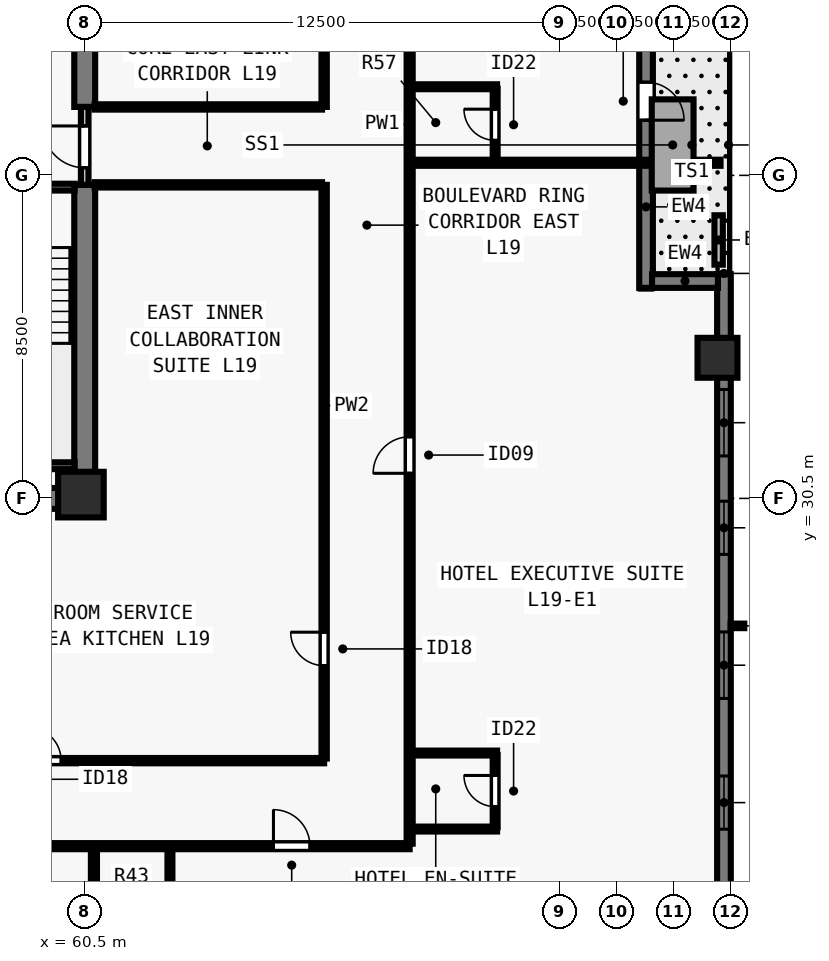
"""IFC4 building model, lengths in metres.
Left out: names, types, materials, properties, quantities, classifications, styles, units other than length and angle.
Written with IfcOpenShell. Run it as: python <this file> out.ifc"""

import sys

from ifc_helpers import new_model, si_unit, direction, frame, frame_2d, origin, origin_2d, place, context, subcontext, project, spatial, rectangle, extrude, element, fill, save


model = new_model("IFC4")
c1 = context("Model", 3, precision=1e-05, world=origin(), true_north=direction((0.0, 1.0)))
c2 = subcontext(c1, "Body", "Model", "MODEL_VIEW")
j1 = project(units=[si_unit("LENGTHUNIT", "METRE"), si_unit("PLANEANGLEUNIT", "RADIAN")], contexts=[c1])
p1 = place(None, origin())
s1 = spatial("IfcSite", under=j1, at=p1, CompositionType="ELEMENT")
p2 = place(p1, origin())
s2 = spatial("IfcBuilding", under=s1, at=p2, CompositionType="ELEMENT")
p3 = place(p2, frame((0.0, 0.0, 72.5)))
s3 = spatial("IfcBuildingStorey", under=s2, at=p3, CompositionType="ELEMENT", Elevation=72.5)
p4 = place(p3, frame((60.4, 30.6, 0.0), z_axis=(0.0, 0.0, 1.0), x_axis=(1.0, 0.0, 0.0)))
e1 = element("IfcColumn", 1, at=p4, inside=s3, PredefinedType="COLUMN", context=c2, shape_type="SweptSolid", body=[
    extrude(rectangle(XDim=1.2, YDim=1.2, at=origin_2d()), origin(), (0.0, 0.0, 1.0), 3.5),
])
p5 = place(p3, frame((77.15, 34.2, 0.0), z_axis=(0.0, 0.0, 1.0), x_axis=(0.0, 1.0, 0.0)))
e2 = element("IfcColumn", 2, at=p5, inside=s3, PredefinedType="COLUMN", context=c2, shape_type="SweptSolid", body=[
    extrude(rectangle(XDim=1.05, YDim=1.05, at=origin_2d()), origin(), (0.0, 0.0, 1.0), 3.5),
])
p6 = place(p3, frame((77.32, 36.4, 0.0), z_axis=(0.0, 0.0, 1.0), x_axis=(0.0, -1.0, 0.0)))
e3 = element("IfcWall", 3, at=p6, inside=s3, PredefinedType="SOLIDWALL", context=c2, shape_type="SweptSolid", body=[
    extrude(rectangle(XDim=19.562, YDim=0.36, at=frame_2d((9.781, 0.0))), origin(), (0.0, 0.0, 1.0), 3.28),
])
p7 = place(p6, frame((3.033, 0.0, 0.8)))
e4 = element("IfcOpeningElement", 4, at=p7, cuts=e3, PredefinedType="OPENING", context=c2, shape_type="SweptSolid", body=[
    extrude(rectangle(XDim=1.75, YDim=1.544, at=frame_2d((0.875, 0.772))), frame((0.0, 0.19, 0.0), z_axis=(0.0, -1.0, 0.0), x_axis=(1.0, 0.0, 0.0)), (0.0, 0.0, 1.0), 0.38),
])
p8 = place(p6, frame((5.973, 0.0, 0.8)))
e5 = element("IfcOpeningElement", 5, at=p8, cuts=e3, PredefinedType="OPENING", context=c2, shape_type="SweptSolid", body=[
    extrude(rectangle(XDim=1.4, YDim=1.544, at=frame_2d((0.7, 0.772))), frame((0.0, 0.19, 0.0), z_axis=(0.0, -1.0, 0.0), x_axis=(1.0, 0.0, 0.0)), (0.0, 0.0, 1.0), 0.38),
])
p9 = place(p6, frame((9.414, 0.0, 0.8)))
e6 = element("IfcOpeningElement", 6, at=p9, cuts=e3, PredefinedType="OPENING", context=c2, shape_type="SweptSolid", body=[
    extrude(rectangle(XDim=1.75, YDim=1.544, at=frame_2d((0.875, 0.772))), frame((0.0, 0.19, 0.0), z_axis=(0.0, -1.0, 0.0), x_axis=(1.0, 0.0, 0.0)), (0.0, 0.0, 1.0), 0.38),
])
p10 = place(p6, frame((13.204, 0.0, 0.8)))
e7 = element("IfcOpeningElement", 7, at=p10, cuts=e3, PredefinedType="OPENING", context=c2, shape_type="SweptSolid", body=[
    extrude(rectangle(XDim=1.4, YDim=1.544, at=frame_2d((0.7, 0.772))), frame((0.0, 0.19, 0.0), z_axis=(0.0, -1.0, 0.0), x_axis=(1.0, 0.0, 0.0)), (0.0, 0.0, 1.0), 0.38),
])
p11 = place(p3, frame((75.27, 43.222, 0.0), z_axis=(0.0, 0.0, 1.0), x_axis=(0.0, -1.0, 0.0)))
e8 = element("IfcWall", 8, at=p11, inside=s3, PredefinedType="SOLIDWALL", context=c2, shape_type="SweptSolid", body=[
    extrude(rectangle(XDim=7.182, YDim=0.36, at=frame_2d((3.591, 0.0))), origin(), (0.0, 0.0, 1.0), 3.28),
])
p12 = place(p11, frame((1.77, 0.0, 0.0)))
e9 = element("IfcOpeningElement", 9, at=p12, cuts=e8, PredefinedType="OPENING", context=c2, shape_type="SweptSolid", body=[
    extrude(rectangle(XDim=1.0, YDim=2.15, at=frame_2d((0.5, 1.075))), frame((0.0, 0.19, 0.0), z_axis=(0.0, -1.0, 0.0), x_axis=(1.0, 0.0, 0.0)), (0.0, 0.0, 1.0), 0.38),
])
p13 = place(p3, frame((75.428, 36.22, 0.0), z_axis=(0.0, 0.0, 1.0), x_axis=(1.0, 0.0, 0.0)))
e10 = element("IfcWall", 10, at=p13, inside=s3, PredefinedType="SOLIDWALL", context=c2, shape_type="SweptSolid", body=[
    extrude(rectangle(XDim=1.734, YDim=0.36, at=frame_2d((0.867, 0.0))), origin(), (0.0, 0.0, 1.0), 3.28),
])
p14 = place(p3, frame((77.18, 36.65, 0.0), z_axis=(0.0, 0.0, 1.0), x_axis=(0.0, 1.0, 0.0)))
e11 = element("IfcWall", 11, at=p14, inside=s3, PredefinedType="PARAPET", context=c2, shape_type="SweptSolid", body=[
    extrude(rectangle(XDim=1.3, YDim=0.22, at=frame_2d((0.65, 0.0))), origin(), (0.0, 0.0, 1.0), 0.55),
])
p15 = place(p3, frame((43.225, 30.5, 0.0), z_axis=(0.0, 0.0, 1.0), x_axis=(1.0, 0.0, 0.0)))
e12 = element("IfcWall", 12, at=p15, inside=s3, PredefinedType="SHEAR", context=c2, shape_type="SweptSolid", body=[
    extrude(rectangle(XDim=17.55, YDim=0.55, at=frame_2d((8.775, 0.0))), origin(), (0.0, 0.0, 1.0), 3.28),
])
p16 = place(p3, frame((60.5, 30.765, 0.0), z_axis=(0.0, 0.0, 1.0), x_axis=(0.0, 1.0, 0.0)))
e13 = element("IfcWall", 13, at=p16, inside=s3, PredefinedType="SHEAR", context=c2, shape_type="SweptSolid", body=[
    extrude(rectangle(XDim=7.985, YDim=0.55, at=frame_2d((3.993, 0.0))), origin(), (0.0, 0.0, 1.0), 3.28),
])
p17 = place(p3, frame((60.5, 40.8, 0.0), z_axis=(0.0, 0.0, 1.0), x_axis=(0.0, 1.0, 0.0)))
e14 = element("IfcWall", 14, at=p17, inside=s3, PredefinedType="SHEAR", context=c2, shape_type="SweptSolid", body=[
    extrude(rectangle(XDim=6.435, YDim=0.55, at=frame_2d((3.218, 0.0))), origin(), (0.0, 0.0, 1.0), 3.28),
])
p18 = place(p3, frame((60.5, 38.75, 0.0), z_axis=(0.0, 0.0, 1.0), x_axis=(0.0, 1.0, 0.0)))
e15 = element("IfcWall", 15, at=p18, inside=s3, PredefinedType="SOLIDWALL", context=c2, shape_type="SweptSolid", body=[
    extrude(rectangle(XDim=2.05, YDim=0.2, at=frame_2d((1.025, 0.0))), origin(), (0.0, 0.0, 1.0), 3.28),
])
p19 = place(p18, frame((0.45, 0.0, 0.0)))
e16 = element("IfcOpeningElement", 16, at=p19, cuts=e15, PredefinedType="OPENING", context=c2, shape_type="SweptSolid", body=[
    extrude(rectangle(XDim=1.1, YDim=2.15, at=frame_2d((0.55, 1.075))), frame((0.0, 0.11, 0.0), z_axis=(0.0, -1.0, 0.0), x_axis=(1.0, 0.0, 0.0)), (0.0, 0.0, 1.0), 0.22),
])
p20 = place(p3, frame((34.95, 21.35, 0.0), z_axis=(0.0, 0.0, 1.0), x_axis=(1.0, 0.0, 0.0)))
e17 = element("IfcWall", 17, at=p20, inside=s3, PredefinedType="PARTITIONING", context=c2, shape_type="SweptSolid", body=[
    extrude(rectangle(XDim=34.1, YDim=0.16, at=frame_2d((17.05, 0.0))), origin(), (0.0, 0.0, 1.0), 3.28),
])
p21 = place(p20, frame((3.614, 0.0, 0.0)))
e18 = element("IfcOpeningElement", 18, at=p21, cuts=e17, PredefinedType="OPENING", context=c2, shape_type="SweptSolid", body=[
    extrude(rectangle(XDim=0.96, YDim=2.15, at=frame_2d((0.48, 1.075))), frame((0.0, 0.09, 0.0), z_axis=(0.0, -1.0, 0.0), x_axis=(1.0, 0.0, 0.0)), (0.0, 0.0, 1.0), 0.18),
])
p22 = place(p20, frame((17.56, 0.0, 0.0)))
e19 = element("IfcOpeningElement", 19, at=p22, cuts=e17, PredefinedType="OPENING", context=c2, shape_type="SweptSolid", body=[
    extrude(rectangle(XDim=0.96, YDim=2.15, at=frame_2d((0.48, 1.075))), frame((0.0, 0.09, 0.0), z_axis=(0.0, -1.0, 0.0), x_axis=(1.0, 0.0, 0.0)), (0.0, 0.0, 1.0), 0.18),
])
p23 = place(p20, frame((30.516, 0.0, 0.0)))
e20 = element("IfcOpeningElement", 20, at=p23, cuts=e17, PredefinedType="OPENING", context=c2, shape_type="SweptSolid", body=[
    extrude(rectangle(XDim=0.96, YDim=2.15, at=frame_2d((0.48, 1.075))), frame((0.0, 0.09, 0.0), z_axis=(0.0, -1.0, 0.0), x_axis=(1.0, 0.0, 0.0)), (0.0, 0.0, 1.0), 0.18),
])
p24 = place(p3, frame((69.05, 21.415, 0.0), z_axis=(0.0, 0.0, 1.0), x_axis=(0.0, 1.0, 0.0)))
e21 = element("IfcWall", 21, at=p24, inside=s3, PredefinedType="PARTITIONING", context=c2, shape_type="SweptSolid", body=[
    extrude(rectangle(XDim=35.17, YDim=0.16, at=frame_2d((17.585, 0.0))), origin(), (0.0, 0.0, 1.0), 3.28),
])
p25 = place(p24, frame((9.746, 0.0, 0.0)))
e22 = element("IfcOpeningElement", 22, at=p25, cuts=e21, PredefinedType="OPENING", context=c2, shape_type="SweptSolid", body=[
    extrude(rectangle(XDim=0.96, YDim=2.15, at=frame_2d((0.48, 1.075))), frame((0.0, 0.09, 0.0), z_axis=(0.0, -1.0, 0.0), x_axis=(1.0, 0.0, 0.0)), (0.0, 0.0, 1.0), 0.18),
])
p26 = place(p24, frame((27.146, 0.0, 0.0)))
e23 = element("IfcOpeningElement", 23, at=p26, cuts=e21, PredefinedType="OPENING", context=c2, shape_type="SweptSolid", body=[
    extrude(rectangle(XDim=0.96, YDim=2.15, at=frame_2d((0.48, 1.075))), frame((0.0, 0.09, 0.0), z_axis=(0.0, -1.0, 0.0), x_axis=(1.0, 0.0, 0.0)), (0.0, 0.0, 1.0), 0.18),
])
p27 = place(p3, frame((37.2, 23.6, 0.0), z_axis=(0.0, 0.0, 1.0), x_axis=(1.0, 0.0, 0.0)))
e24 = element("IfcWall", 24, at=p27, inside=s3, PredefinedType="PARTITIONING", context=c2, shape_type="SweptSolid", body=[
    extrude(rectangle(XDim=29.6, YDim=0.14, at=frame_2d((14.8, 0.0))), origin(), (0.0, 0.0, 1.0), 3.28),
])
p28 = place(p27, frame((1.2, 0.0, 0.0)))
e25 = element("IfcOpeningElement", 25, at=p28, cuts=e24, PredefinedType="OPENING", context=c2, shape_type="SweptSolid", body=[
    extrude(rectangle(XDim=0.88, YDim=2.1, at=frame_2d((0.44, 1.05))), frame((0.0, 0.08, 0.0), z_axis=(0.0, -1.0, 0.0), x_axis=(1.0, 0.0, 0.0)), (0.0, 0.0, 1.0), 0.16),
])
p29 = place(p27, frame((11.3, 0.0, 0.0)))
e26 = element("IfcOpeningElement", 26, at=p29, cuts=e24, PredefinedType="OPENING", context=c2, shape_type="SweptSolid", body=[
    extrude(rectangle(XDim=0.88, YDim=2.1, at=frame_2d((0.44, 1.05))), frame((0.0, 0.08, 0.0), z_axis=(0.0, -1.0, 0.0), x_axis=(1.0, 0.0, 0.0)), (0.0, 0.0, 1.0), 0.16),
])
p30 = place(p27, frame((21.8, 0.0, 0.0)))
e27 = element("IfcOpeningElement", 27, at=p30, cuts=e24, PredefinedType="OPENING", context=c2, shape_type="SweptSolid", body=[
    extrude(rectangle(XDim=0.88, YDim=2.1, at=frame_2d((0.44, 1.05))), frame((0.0, 0.08, 0.0), z_axis=(0.0, -1.0, 0.0), x_axis=(1.0, 0.0, 0.0)), (0.0, 0.0, 1.0), 0.16),
])
p31 = place(p3, frame((66.8, 23.655, 0.0), z_axis=(0.0, 0.0, 1.0), x_axis=(0.0, 1.0, 0.0)))
e28 = element("IfcWall", 28, at=p31, inside=s3, PredefinedType="PARTITIONING", context=c2, shape_type="SweptSolid", body=[
    extrude(rectangle(XDim=15.095, YDim=0.14, at=frame_2d((7.547, 0.0))), origin(), (0.0, 0.0, 1.0), 3.28),
])
p32 = place(p31, frame((2.445, 0.0, 0.0)))
e29 = element("IfcOpeningElement", 29, at=p32, cuts=e28, PredefinedType="OPENING", context=c2, shape_type="SweptSolid", body=[
    extrude(rectangle(XDim=0.88, YDim=2.1, at=frame_2d((0.44, 1.05))), frame((0.0, 0.08, 0.0), z_axis=(0.0, -1.0, 0.0), x_axis=(1.0, 0.0, 0.0)), (0.0, 0.0, 1.0), 0.16),
])
p33 = place(p3, frame((66.8, 40.8, 0.0), z_axis=(0.0, 0.0, 1.0), x_axis=(0.0, 1.0, 0.0)))
e30 = element("IfcWall", 30, at=p33, inside=s3, PredefinedType="PARTITIONING", context=c2, shape_type="SweptSolid", body=[
    extrude(rectangle(XDim=13.545, YDim=0.14, at=frame_2d((6.772, 0.0))), origin(), (0.0, 0.0, 1.0), 3.28),
])
p34 = place(p33, frame((2.5, 0.0, 0.0)))
e31 = element("IfcOpeningElement", 31, at=p34, cuts=e30, PredefinedType="OPENING", context=c2, shape_type="SweptSolid", body=[
    extrude(rectangle(XDim=0.88, YDim=2.1, at=frame_2d((0.44, 1.05))), frame((0.0, 0.08, 0.0), z_axis=(0.0, -1.0, 0.0), x_axis=(1.0, 0.0, 0.0)), (0.0, 0.0, 1.0), 0.16),
])
for number, where, z_axis, x_axis in (
    (32, (60.76, 38.75, 0.0), (0.0, 0.0, 1.0), (1.0, 0.0, 0.0)),
    (33, (60.76, 40.8, 0.0), (0.0, 0.0, 1.0), (1.0, 0.0, 0.0)),
):
    element("IfcWall", number, at=place(p3, frame(where, z_axis=z_axis, x_axis=x_axis)), inside=s3, PredefinedType="PARTITIONING", context=c2, shape_type="SweptSolid", body=[
        extrude(rectangle(XDim=5.985, YDim=0.14, at=frame_2d((2.993, 0.0))), origin(), (0.0, 0.0, 1.0), 3.28),
    ])
p35 = place(p3, frame((60.742, 13.845, 0.0), z_axis=(0.0, 0.0, 1.0), x_axis=(0.0, 1.0, 0.0)))
e34 = element("IfcWall", 34, at=p35, inside=s3, PredefinedType="PARTITIONING", context=c2, shape_type="SweptSolid", body=[
    extrude(rectangle(XDim=7.44, YDim=0.16, at=frame_2d((3.72, 0.0))), origin(), (0.0, 0.0, 1.0), 3.28),
])
p36 = place(p3, frame((62.742, 19.05, 0.0), z_axis=(0.0, 0.0, 1.0), x_axis=(0.0, 1.0, 0.0)))
e35 = element("IfcWall", 35, at=p36, inside=s3, PredefinedType="PLUMBINGWALL", context=c2, shape_type="SweptSolid", body=[
    extrude(rectangle(XDim=2.235, YDim=0.13, at=frame_2d((1.117, 0.0))), origin(), (0.0, 0.0, 1.0), 3.28),
])
p37 = place(p3, frame((69.115, 21.8, 0.0), z_axis=(0.0, 0.0, 1.0), x_axis=(1.0, 0.0, 0.0)))
e36 = element("IfcWall", 36, at=p37, inside=s3, PredefinedType="PLUMBINGWALL", context=c2, shape_type="SweptSolid", body=[
    extrude(rectangle(XDim=2.235, YDim=0.13, at=frame_2d((1.118, 0.0))), origin(), (0.0, 0.0, 1.0), 2.849),
])
p38 = place(p3, frame((69.115, 23.8, 0.0), z_axis=(0.0, 0.0, 1.0), x_axis=(1.0, 0.0, 0.0)))
e37 = element("IfcWall", 37, at=p38, inside=s3, PredefinedType="PLUMBINGWALL", context=c2, shape_type="SweptSolid", body=[
    extrude(rectangle(XDim=2.235, YDim=0.13, at=frame_2d((1.118, 0.0))), origin(), (0.0, 0.0, 1.0), 3.28),
])
p39 = place(p3, frame((71.3, 21.85, 0.0), z_axis=(0.0, 0.0, 1.0), x_axis=(0.0, 1.0, 0.0)))
e38 = element("IfcWall", 38, at=p39, inside=s3, PredefinedType="PLUMBINGWALL", context=c2, shape_type="SweptSolid", body=[
    extrude(rectangle(XDim=1.9, YDim=0.13, at=frame_2d((0.95, 0.0))), origin(), (0.0, 0.0, 1.0), 3.28),
])
p40 = place(p39, frame((0.54, 0.0, 0.0)))
e39 = element("IfcOpeningElement", 39, at=p40, cuts=e38, PredefinedType="OPENING", context=c2, shape_type="SweptSolid", body=[
    extrude(rectangle(XDim=0.82, YDim=2.1, at=frame_2d((0.41, 1.05))), frame((0.0, 0.075, 0.0), z_axis=(0.0, -1.0, 0.0), x_axis=(1.0, 0.0, 0.0)), (0.0, 0.0, 1.0), 0.15),
])
p41 = place(p3, frame((69.115, 39.332, 0.0), z_axis=(0.0, 0.0, 1.0), x_axis=(1.0, 0.0, 0.0)))
e40 = element("IfcWall", 40, at=p41, inside=s3, PredefinedType="PARTITIONING", context=c2, shape_type="SweptSolid", body=[
    extrude(rectangle(XDim=8.115, YDim=0.16, at=frame_2d((4.058, 0.0))), origin(), (0.0, 0.0, 1.0), 3.28),
])
p42 = place(p3, frame((69.115, 41.332, 0.0), z_axis=(0.0, 0.0, 1.0), x_axis=(1.0, 0.0, 0.0)))
e41 = element("IfcWall", 41, at=p42, inside=s3, PredefinedType="PLUMBINGWALL", context=c2, shape_type="SweptSolid", body=[
    extrude(rectangle(XDim=2.235, YDim=0.13, at=frame_2d((1.118, 0.0))), origin(), (0.0, 0.0, 1.0), 3.28),
])
p43 = place(p3, frame((71.3, 39.396, 0.0), z_axis=(0.0, 0.0, 1.0), x_axis=(0.0, 1.0, 0.0)))
e42 = element("IfcWall", 42, at=p43, inside=s3, PredefinedType="PLUMBINGWALL", context=c2, shape_type="SweptSolid", body=[
    extrude(rectangle(XDim=1.885, YDim=0.13, at=frame_2d((0.942, 0.0))), origin(), (0.0, 0.0, 1.0), 3.28),
])
p44 = place(p43, frame((0.525, 0.0, 0.0)))
e43 = element("IfcOpeningElement", 43, at=p44, cuts=e42, PredefinedType="OPENING", context=c2, shape_type="SweptSolid", body=[
    extrude(rectangle(XDim=0.82, YDim=2.1, at=frame_2d((0.41, 1.05))), frame((0.0, 0.075, 0.0), z_axis=(0.0, -1.0, 0.0), x_axis=(1.0, 0.0, 0.0)), (0.0, 0.0, 1.0), 0.15),
])
p45 = place(p3, frame((57.005, 38.69, 0.0), z_axis=(0.0, 0.0, 1.0), x_axis=(1.0, 0.0, 0.0)))
e44 = element("IfcWall", 44, at=p45, inside=s3, PredefinedType="SOLIDWALL", context=c2, shape_type="SweptSolid", body=[
    extrude(rectangle(XDim=3.23, YDim=0.18, at=frame_2d((1.615, 0.0))), origin(), (0.0, 0.0, 1.0), 3.28),
])
p46 = place(p45, frame((1.14, 0.0, 0.0)))
e45 = element("IfcOpeningElement", 45, at=p46, cuts=e44, PredefinedType="OPENING", context=c2, shape_type="SweptSolid", body=[
    extrude(rectangle(XDim=0.95, YDim=2.15, at=frame_2d((0.475, 1.075))), frame((0.0, 0.1, 0.0), z_axis=(0.0, -1.0, 0.0), x_axis=(1.0, 0.0, 0.0)), (0.0, 0.0, 1.0), 0.2),
])
p47 = place(p3, frame((57.005, 31.36, 0.0), z_axis=(0.0, 0.0, 1.0), x_axis=(1.0, 0.0, 0.0)))
e46 = element("IfcWall", 46, at=p47, inside=s3, PredefinedType="SOLIDWALL", context=c2, shape_type="SweptSolid", body=[
    extrude(rectangle(XDim=3.23, YDim=0.18, at=frame_2d((1.615, 0.0))), origin(), (0.0, 0.0, 1.0), 3.28),
])
p48 = place(p7, origin())
e47 = element("IfcWindow", 47, at=p48, inside=s3, PartitioningType="SINGLE_PANEL", PredefinedType="WINDOW", context=c2, shape_type="SweptSolid", body=[
    extrude(rectangle(XDim=1.75, YDim=1.544, at=frame_2d((0.875, 0.772))), frame((0.0, -0.05, 0.0), z_axis=(0.0, -1.0, 0.0), x_axis=(1.0, 0.0, 0.0)), (0.0, 0.0, 1.0), 0.06),
])
fill(e4, e47)
p49 = place(p8, origin())
e48 = element("IfcWindow", 48, at=p49, inside=s3, PartitioningType="SINGLE_PANEL", PredefinedType="WINDOW", context=c2, shape_type="SweptSolid", body=[
    extrude(rectangle(XDim=1.4, YDim=1.544, at=frame_2d((0.7, 0.772))), frame((0.0, -0.05, 0.0), z_axis=(0.0, -1.0, 0.0), x_axis=(1.0, 0.0, 0.0)), (0.0, 0.0, 1.0), 0.06),
])
fill(e5, e48)
p50 = place(p9, origin())
e49 = element("IfcWindow", 49, at=p50, inside=s3, PartitioningType="SINGLE_PANEL", PredefinedType="WINDOW", context=c2, shape_type="SweptSolid", body=[
    extrude(rectangle(XDim=1.75, YDim=1.544, at=frame_2d((0.875, 0.772))), frame((0.0, -0.05, 0.0), z_axis=(0.0, -1.0, 0.0), x_axis=(1.0, 0.0, 0.0)), (0.0, 0.0, 1.0), 0.06),
])
fill(e6, e49)
p51 = place(p10, origin())
e50 = element("IfcWindow", 50, at=p51, inside=s3, PartitioningType="SINGLE_PANEL", PredefinedType="WINDOW", context=c2, shape_type="SweptSolid", body=[
    extrude(rectangle(XDim=1.4, YDim=1.544, at=frame_2d((0.7, 0.772))), frame((0.0, -0.05, 0.0), z_axis=(0.0, -1.0, 0.0), x_axis=(1.0, 0.0, 0.0)), (0.0, 0.0, 1.0), 0.06),
])
fill(e7, e50)
p52 = place(p12, origin())
e51 = element("IfcDoor", 51, at=p52, inside=s3, OperationType="SINGLE_SWING_RIGHT", PredefinedType="DOOR", context=c2, shape_type="SweptSolid", body=[
    extrude(rectangle(XDim=1.0, YDim=2.15, at=frame_2d((0.5, 1.075))), frame((0.0, 0.025, 0.0), z_axis=(0.0, -1.0, 0.0), x_axis=(1.0, 0.0, 0.0)), (0.0, 0.0, 1.0), 0.05),
])
fill(e9, e51)
p53 = place(p19, origin())
e52 = element("IfcDoor", 52, at=p53, inside=s3, OperationType="SINGLE_SWING_RIGHT", PredefinedType="DOOR", context=c2, shape_type="SweptSolid", body=[
    extrude(rectangle(XDim=1.1, YDim=2.15, at=frame_2d((0.55, 1.075))), frame((0.0, 0.025, 0.0), z_axis=(0.0, -1.0, 0.0), x_axis=(1.0, 0.0, 0.0)), (0.0, 0.0, 1.0), 0.05),
])
fill(e16, e52)
p54 = place(p30, origin())
e53 = element("IfcDoor", 53, at=p54, inside=s3, OperationType="SINGLE_SWING_LEFT", PredefinedType="DOOR", context=c2, shape_type="SweptSolid", body=[
    extrude(rectangle(XDim=0.88, YDim=2.1, at=frame_2d((0.44, 1.05))), frame((0.0, 0.025, 0.0), z_axis=(0.0, -1.0, 0.0), x_axis=(1.0, 0.0, 0.0)), (0.0, 0.0, 1.0), 0.05),
])
fill(e27, e53)
p55 = place(p32, origin())
e54 = element("IfcDoor", 54, at=p55, inside=s3, OperationType="SINGLE_SWING_RIGHT", PredefinedType="DOOR", context=c2, shape_type="SweptSolid", body=[
    extrude(rectangle(XDim=0.88, YDim=2.1, at=frame_2d((0.44, 1.05))), frame((0.0, 0.025, 0.0), z_axis=(0.0, -1.0, 0.0), x_axis=(1.0, 0.0, 0.0)), (0.0, 0.0, 1.0), 0.05),
])
fill(e29, e54)
p56 = place(p23, origin())
e55 = element("IfcDoor", 55, at=p56, inside=s3, OperationType="SINGLE_SWING_LEFT", PredefinedType="DOOR", context=c2, shape_type="SweptSolid", body=[
    extrude(rectangle(XDim=0.96, YDim=2.15, at=frame_2d((0.48, 1.075))), frame((0.0, 0.025, 0.0), z_axis=(0.0, -1.0, 0.0), x_axis=(1.0, 0.0, 0.0)), (0.0, 0.0, 1.0), 0.05),
])
fill(e20, e55)
p57 = place(p40, origin())
e56 = element("IfcDoor", 56, at=p57, inside=s3, OperationType="SINGLE_SWING_RIGHT", PredefinedType="DOOR", context=c2, shape_type="SweptSolid", body=[
    extrude(rectangle(XDim=0.82, YDim=2.1, at=frame_2d((0.41, 1.05))), frame((0.0, 0.025, 0.0), z_axis=(0.0, -1.0, 0.0), x_axis=(1.0, 0.0, 0.0)), (0.0, 0.0, 1.0), 0.05),
])
fill(e39, e56)
p58 = place(p25, origin())
e57 = element("IfcDoor", 57, at=p58, inside=s3, OperationType="SINGLE_SWING_LEFT", PredefinedType="DOOR", context=c2, shape_type="SweptSolid", body=[
    extrude(rectangle(XDim=0.96, YDim=2.15, at=frame_2d((0.48, 1.075))), frame((0.0, 0.025, 0.0), z_axis=(0.0, -1.0, 0.0), x_axis=(1.0, 0.0, 0.0)), (0.0, 0.0, 1.0), 0.05),
])
fill(e22, e57)
p59 = place(p44, origin())
e58 = element("IfcDoor", 58, at=p59, inside=s3, OperationType="SINGLE_SWING_RIGHT", PredefinedType="DOOR", context=c2, shape_type="SweptSolid", body=[
    extrude(rectangle(XDim=0.82, YDim=2.1, at=frame_2d((0.41, 1.05))), frame((0.0, 0.025, 0.0), z_axis=(0.0, -1.0, 0.0), x_axis=(1.0, 0.0, 0.0)), (0.0, 0.0, 1.0), 0.05),
])
fill(e43, e58)
save(model, sys.argv[1])
